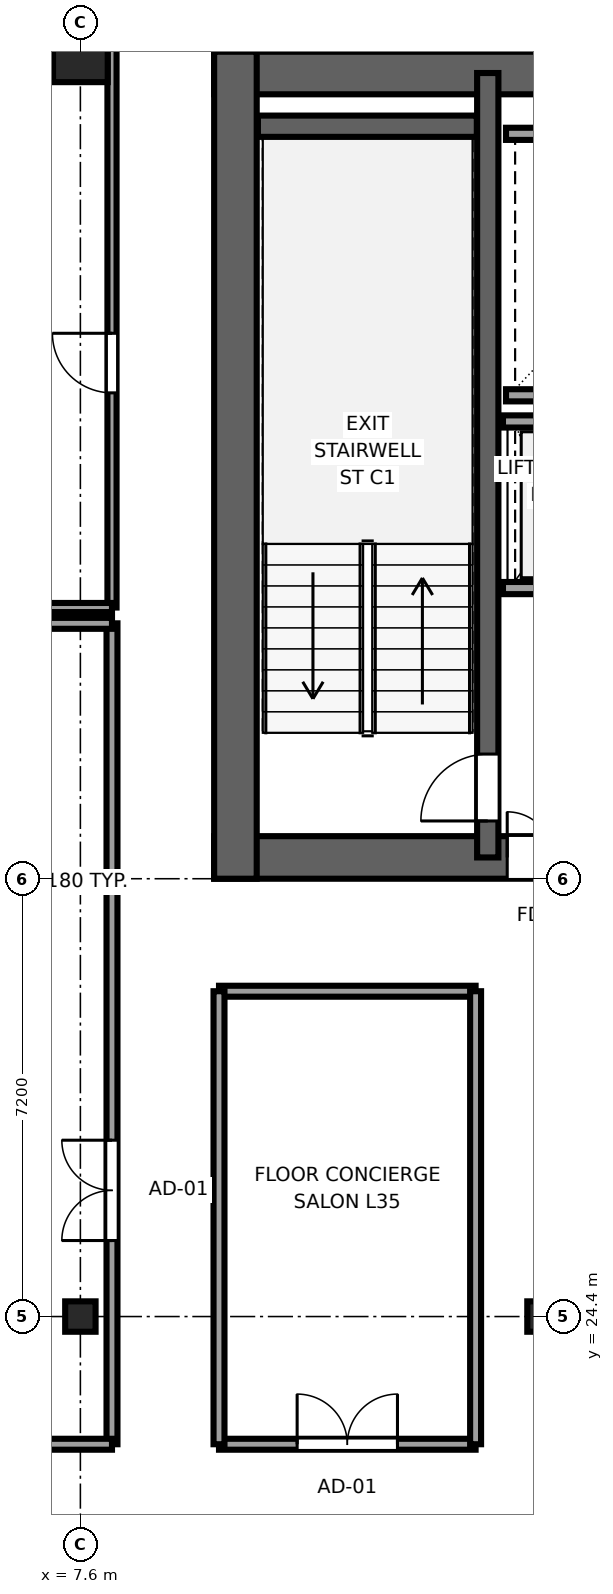
"""IFC4 building model, lengths in metres.
Left out: names, types, materials, properties, quantities, classifications, styles, units other than length and angle.
Written with IfcOpenShell. Run it as: python <this file> out.ifc"""

import sys

from ifc_helpers import new_model, si_unit, direction, frame, frame_2d, origin, origin_2d, place, context, subcontext, project, spatial, rectangle, i_section, extrude, source, transform, mapped, element, fill, save


model = new_model("IFC4")
c1 = context("Model", 3, precision=1e-05, world=origin(), true_north=direction((0.0, 1.0)))
c2 = subcontext(c1, "Body", "Model", "MODEL_VIEW")
j1 = project(units=[si_unit("LENGTHUNIT", "METRE"), si_unit("PLANEANGLEUNIT", "RADIAN")], contexts=[c1])
p1 = place(None, origin())
s1 = spatial("IfcSite", under=j1, at=p1, CompositionType="ELEMENT")
p2 = place(p1, origin())
s2 = spatial("IfcBuilding", under=s1, at=p2, CompositionType="ELEMENT")
p3 = place(p2, frame((0.0, 0.0, 136.4)))
s3 = spatial("IfcBuildingStorey", under=s2, at=p3, CompositionType="ELEMENT", Elevation=136.4)
p4 = place(p3, frame((9.8, 31.95, 0.0), z_axis=(0.0, 0.0, 1.0), x_axis=(1.0, 0.0, 0.0)))
e1 = element("IfcWall", 1, at=p4, inside=s3, PredefinedType="SHEAR", context=c2, shape_type="SweptSolid", body=[
    extrude(rectangle(XDim=26.4, YDim=0.7, at=frame_2d((13.2, 0.0))), origin(), (0.0, 0.0, 1.0), 3.55),
])
p5 = place(p4, frame((6.32, 0.0, 0.0), z_axis=(0.0, 0.0, 1.0), x_axis=(-1.0, 0.0, 0.0)))
e2 = element("IfcOpeningElement", 2, at=p5, cuts=e1, PredefinedType="OPENING", context=c2, shape_type="SweptSolid", body=[
    extrude(rectangle(XDim=1.5, YDim=2.04, at=frame_2d((0.75, 1.02))), frame((0.0, 0.36, 0.0), z_axis=(0.0, -1.0, 0.0), x_axis=(1.0, 0.0, 0.0)), (0.0, 0.0, 1.0), 0.72),
])
p6 = place(p4, frame((13.95, 0.0, 0.0), z_axis=(0.0, 0.0, 1.0), x_axis=(-1.0, 0.0, 0.0)))
e3 = element("IfcOpeningElement", 3, at=p6, cuts=e1, PredefinedType="OPENING", context=c2, shape_type="SweptSolid", body=[
    extrude(rectangle(XDim=1.5, YDim=2.04, at=frame_2d((0.75, 1.02))), frame((0.0, 0.36, 0.0), z_axis=(0.0, -1.0, 0.0), x_axis=(1.0, 0.0, 0.0)), (0.0, 0.0, 1.0), 0.72),
])
p7 = place(p4, frame((21.58, 0.0, 0.0), z_axis=(0.0, 0.0, 1.0), x_axis=(-1.0, 0.0, 0.0)))
e4 = element("IfcOpeningElement", 4, at=p7, cuts=e1, PredefinedType="OPENING", context=c2, shape_type="SweptSolid", body=[
    extrude(rectangle(XDim=1.5, YDim=2.04, at=frame_2d((0.75, 1.02))), frame((0.0, 0.36, 0.0), z_axis=(0.0, -1.0, 0.0), x_axis=(1.0, 0.0, 0.0)), (0.0, 0.0, 1.0), 0.72),
])
p8 = place(p4, frame((8.37, 0.0, 0.0), z_axis=(0.0, 0.0, 1.0), x_axis=(-1.0, 0.0, 0.0)))
e5 = element("IfcOpeningElement", 5, at=p8, cuts=e1, PredefinedType="OPENING", context=c2, shape_type="SweptSolid", body=[
    extrude(rectangle(XDim=0.82, YDim=2.01, at=frame_2d((0.41, 1.005))), frame((0.0, 0.36, 0.0), z_axis=(0.0, -1.0, 0.0), x_axis=(1.0, 0.0, 0.0)), (0.0, 0.0, 1.0), 0.72),
])
p9 = place(p4, frame((18.87, 0.0, 0.0), z_axis=(0.0, 0.0, 1.0), x_axis=(-1.0, 0.0, 0.0)))
e6 = element("IfcOpeningElement", 6, at=p9, cuts=e1, PredefinedType="OPENING", context=c2, shape_type="SweptSolid", body=[
    extrude(rectangle(XDim=0.82, YDim=2.01, at=frame_2d((0.41, 1.005))), frame((0.0, 0.36, 0.0), z_axis=(0.0, -1.0, 0.0), x_axis=(1.0, 0.0, 0.0)), (0.0, 0.0, 1.0), 0.72),
])
p10 = place(p3, frame((9.8, 44.85, 0.0), z_axis=(0.0, 0.0, 1.0), x_axis=(1.0, 0.0, 0.0)))
e7 = element("IfcWall", 7, at=p10, inside=s3, PredefinedType="SHEAR", context=c2, shape_type="SweptSolid", body=[
    extrude(rectangle(XDim=26.4, YDim=0.7, at=frame_2d((13.2, 0.0))), origin(), (0.0, 0.0, 1.0), 3.55),
])
p11 = place(p3, frame((10.15, 31.6, 0.0), z_axis=(0.0, 0.0, 1.0), x_axis=(0.0, 1.0, 0.0)))
e8 = element("IfcWall", 8, at=p11, inside=s3, PredefinedType="SHEAR", context=c2, shape_type="SweptSolid", body=[
    extrude(rectangle(XDim=13.6, YDim=0.7, at=frame_2d((6.8, 0.0))), origin(), (0.0, 0.0, 1.0), 3.55),
])
p12 = place(p3, frame((14.3, 31.95, 0.0), z_axis=(0.0, 0.0, 1.0), x_axis=(0.0, 1.0, 0.0)))
e9 = element("IfcWall", 9, at=p12, inside=s3, PredefinedType="SHEAR", context=c2, shape_type="SweptSolid", body=[
    extrude(rectangle(XDim=12.9, YDim=0.35, at=frame_2d((6.45, 0.0))), origin(), (0.0, 0.0, 1.0), 3.55),
])
p13 = place(p12, frame((0.6, 0.0, 0.0)))
e10 = element("IfcOpeningElement", 10, at=p13, cuts=e9, PredefinedType="OPENING", context=c2, shape_type="SweptSolid", body=[
    extrude(rectangle(XDim=1.1, YDim=2.12, at=frame_2d((0.55, 1.06))), frame((0.0, 0.185, 0.0), z_axis=(0.0, -1.0, 0.0), x_axis=(1.0, 0.0, 0.0)), (0.0, 0.0, 1.0), 0.37),
])
p14 = place(p3, frame((10.52, 43.975, 0.0), z_axis=(0.0, 0.0, 1.0), x_axis=(1.0, 0.0, 0.0)))
e11 = element("IfcWall", 11, at=p14, inside=s3, PredefinedType="SHEAR", context=c2, shape_type="SweptSolid", body=[
    extrude(rectangle(XDim=3.6, YDim=0.35, at=frame_2d((1.8, 0.0))), origin(), (0.0, 0.0, 1.0), 3.55),
])
m1 = source(origin(), c2, "Body", "SweptSolid", [
    extrude(i_section(OverallWidth=0.5, OverallDepth=0.5, WebThickness=0.022, FlangeThickness=0.034, at=origin_2d()), origin(), (0.0, 0.0, 1.0), 3.55),
])
for number, where, z_axis, x_axis in (
    (12, (7.6, 24.4, 0.0), (0.0, 0.0, 1.0), (1.0, 0.0, 0.0)),
    (13, (15.2, 24.4, 0.0), (0.0, 0.0, 1.0), (1.0, 0.0, 0.0)),
):
    element("IfcColumn", number, at=place(p3, frame(where, z_axis=z_axis, x_axis=x_axis)), inside=s3, PredefinedType="COLUMN", context=c2, shape_type="MappedRepresentation", body=[
        mapped(m1, transform((0.0, 0.0, 0.0), x_axis=(1.0, 0.0, 0.0), y_axis=(0.0, 1.0, 0.0), z_axis=(0.0, 0.0, 1.0), scale=1.0)),
    ])
m2 = source(origin(), c2, "Body", "SweptSolid", [
    extrude(rectangle(XDim=0.9, YDim=0.9, at=origin_2d()), origin(), (0.0, 0.0, 1.0), 3.55),
])
p15 = place(p3, frame((7.6, 45.15, 0.0), z_axis=(0.0, 0.0, 1.0), x_axis=(1.0, 0.0, 0.0)))
e14 = element("IfcColumn", 14, at=p15, inside=s3, PredefinedType="COLUMN", context=c2, shape_type="MappedRepresentation", body=[
    mapped(m2, transform((0.0, 0.0, 0.0), x_axis=(1.0, 0.0, 0.0), y_axis=(0.0, 1.0, 0.0), z_axis=(0.0, 0.0, 1.0), scale=1.0)),
])
for number, where, z_axis, x_axis in (
    (15, (14.6, 39.55, 0.0), (0.0, 0.0, 1.0), (1.0, 0.0, 0.0)),
    (16, (14.6, 43.85, 0.0), (0.0, 0.0, 1.0), (1.0, 0.0, 0.0)),
):
    element("IfcWall", number, at=place(p3, frame(where, z_axis=z_axis, x_axis=x_axis)), inside=s3, PredefinedType="SOLIDWALL", context=c2, shape_type="SweptSolid", body=[
        extrude(rectangle(XDim=4.1, YDim=0.2, at=frame_2d((2.05, 0.0))), origin(), (0.0, 0.0, 1.0), 3.37),
    ])
p16 = place(p3, frame((14.55, 36.38, 0.0), z_axis=(0.0, 0.0, 1.0), x_axis=(1.0, 0.0, 0.0)))
e17 = element("IfcWall", 17, at=p16, inside=s3, PredefinedType="SOLIDWALL", context=c2, shape_type="SweptSolid", body=[
    extrude(rectangle(XDim=4.075, YDim=0.2, at=frame_2d((2.038, 0.0))), origin(), (0.0, 0.0, 1.0), 3.37),
])
p17 = place(p16, frame((0.55, 0.0, 0.0)))
e18 = element("IfcOpeningElement", 18, at=p17, cuts=e17, PredefinedType="OPENING", context=c2, shape_type="SweptSolid", body=[
    extrude(rectangle(XDim=1.1, YDim=2.12, at=frame_2d((0.55, 1.06))), frame((0.0, 0.11, 0.0), z_axis=(0.0, -1.0, 0.0), x_axis=(1.0, 0.0, 0.0)), (0.0, 0.0, 1.0), 0.22),
])
p18 = place(p16, frame((2.45, 0.0, 0.0)))
e19 = element("IfcOpeningElement", 19, at=p18, cuts=e17, PredefinedType="OPENING", context=c2, shape_type="SweptSolid", body=[
    extrude(rectangle(XDim=1.1, YDim=2.12, at=frame_2d((0.55, 1.06))), frame((0.0, 0.11, 0.0), z_axis=(0.0, -1.0, 0.0), x_axis=(1.0, 0.0, 0.0)), (0.0, 0.0, 1.0), 0.22),
])
p19 = place(p3, frame((14.55, 39.12, 0.0), z_axis=(0.0, 0.0, 1.0), x_axis=(1.0, 0.0, 0.0)))
e20 = element("IfcWall", 20, at=p19, inside=s3, PredefinedType="SOLIDWALL", context=c2, shape_type="SweptSolid", body=[
    extrude(rectangle(XDim=4.075, YDim=0.2, at=frame_2d((2.038, 0.0))), origin(), (0.0, 0.0, 1.0), 3.37),
])
p20 = place(p3, frame((8.12, 22.3, 0.0), z_axis=(0.0, 0.0, 1.0), x_axis=(0.0, 1.0, 0.0)))
e21 = element("IfcWall", 21, at=p20, inside=s3, PredefinedType="PARTITIONING", context=c2, shape_type="SweptSolid", body=[
    extrude(rectangle(XDim=13.5, YDim=0.18, at=frame_2d((6.75, 0.0))), origin(), (0.0, 0.0, 1.0), 3.37),
])
p21 = place(p20, frame((3.35, 0.0, 0.0)))
e22 = element("IfcOpeningElement", 22, at=p21, cuts=e21, PredefinedType="OPENING", context=c2, shape_type="SweptSolid", body=[
    extrude(rectangle(XDim=1.65, YDim=2.15, at=frame_2d((0.825, 1.075))), frame((0.0, 0.1, 0.0), z_axis=(0.0, -1.0, 0.0), x_axis=(1.0, 0.0, 0.0)), (0.0, 0.0, 1.0), 0.2),
])
for number, where, z_axis, x_axis in (
    (23, (0.405, 22.3, 0.0), (0.0, 0.0, 1.0), (1.0, 0.0, 0.0)),
    (24, (0.405, 35.8, 0.0), (0.0, 0.0, 1.0), (1.0, 0.0, 0.0)),
):
    element("IfcWall", number, at=place(p3, frame(where, z_axis=z_axis, x_axis=x_axis)), inside=s3, PredefinedType="PARTITIONING", context=c2, shape_type="SweptSolid", body=[
        extrude(rectangle(XDim=7.715, YDim=0.18, at=frame_2d((3.857, 0.0))), origin(), (0.0, 0.0, 1.0), 3.37),
    ])
p22 = place(p3, frame((8.12, 36.06, 0.0), z_axis=(0.0, 0.0, 1.0), x_axis=(0.0, 1.0, 0.0)))
e25 = element("IfcWall", 25, at=p22, inside=s3, PredefinedType="PARTITIONING", context=c2, shape_type="SweptSolid", body=[
    extrude(rectangle(XDim=9.535, YDim=0.15, at=frame_2d((4.768, 0.0))), origin(), (0.0, 0.0, 1.0), 3.37),
])
p23 = place(p22, frame((3.53, 0.0, 0.0)))
e26 = element("IfcOpeningElement", 26, at=p23, cuts=e25, PredefinedType="OPENING", context=c2, shape_type="SweptSolid", body=[
    extrude(rectangle(XDim=0.98, YDim=2.12, at=frame_2d((0.49, 1.06))), frame((0.0, 0.085, 0.0), z_axis=(0.0, -1.0, 0.0), x_axis=(1.0, 0.0, 0.0)), (0.0, 0.0, 1.0), 0.17),
])
p24 = place(p3, frame((2.77, 36.06, 0.0), z_axis=(0.0, 0.0, 1.0), x_axis=(1.0, 0.0, 0.0)))
e27 = element("IfcWall", 27, at=p24, inside=s3, PredefinedType="PARTITIONING", context=c2, shape_type="SweptSolid", body=[
    extrude(rectangle(XDim=5.35, YDim=0.15, at=frame_2d((2.675, 0.0))), origin(), (0.0, 0.0, 1.0), 3.37),
])
p25 = place(p3, frame((9.88, 22.3, 0.0), z_axis=(0.0, 0.0, 1.0), x_axis=(1.0, 0.0, 0.0)))
e28 = element("IfcWall", 28, at=p25, inside=s3, PredefinedType="PARTITIONING", context=c2, shape_type="SweptSolid", body=[
    extrude(rectangle(XDim=4.22, YDim=0.18, at=frame_2d((2.11, 0.0))), origin(), (0.0, 0.0, 1.0), 3.37),
])
p26 = place(p25, frame((1.285, 0.0, 0.0)))
e29 = element("IfcOpeningElement", 29, at=p26, cuts=e28, PredefinedType="OPENING", context=c2, shape_type="SweptSolid", body=[
    extrude(rectangle(XDim=1.65, YDim=2.15, at=frame_2d((0.825, 1.075))), frame((0.0, 0.1, 0.0), z_axis=(0.0, -1.0, 0.0), x_axis=(1.0, 0.0, 0.0)), (0.0, 0.0, 1.0), 0.2),
])
p27 = place(p3, frame((9.88, 29.75, 0.0), z_axis=(0.0, 0.0, 1.0), x_axis=(1.0, 0.0, 0.0)))
e30 = element("IfcWall", 30, at=p27, inside=s3, PredefinedType="PARTITIONING", context=c2, shape_type="SweptSolid", body=[
    extrude(rectangle(XDim=4.22, YDim=0.18, at=frame_2d((2.11, 0.0))), origin(), (0.0, 0.0, 1.0), 3.37),
])
for number, where, z_axis, x_axis in (
    (31, (9.88, 22.3, 0.0), (0.0, 0.0, 1.0), (0.0, 1.0, 0.0)),
    (32, (14.1, 22.3, 0.0), (0.0, 0.0, 1.0), (0.0, 1.0, 0.0)),
):
    element("IfcWall", number, at=place(p3, frame(where, z_axis=z_axis, x_axis=x_axis)), inside=s3, PredefinedType="PARTITIONING", context=c2, shape_type="SweptSolid", body=[
        extrude(rectangle(XDim=7.45, YDim=0.18, at=frame_2d((3.725, 0.0))), origin(), (0.0, 0.0, 1.0), 3.37),
    ])
m3 = source(origin(), c2, "Body", "SweptSolid", [
    extrude(rectangle(XDim=1.1, YDim=2.12, at=frame_2d((0.55, 1.06))), frame((0.0, 0.025, 0.0), z_axis=(0.0, -1.0, 0.0), x_axis=(1.0, 0.0, 0.0)), (0.0, 0.0, 1.0), 0.05),
])
p28 = place(p13, origin())
e33 = element("IfcDoor", 33, at=p28, inside=s3, OperationType="SINGLE_SWING_LEFT", PredefinedType="DOOR", context=c2, shape_type="MappedRepresentation", body=[
    mapped(m3, transform((0.0, 0.0, 0.0), x_axis=(1.0, 0.0, 0.0), y_axis=(0.0, 1.0, 0.0), z_axis=(0.0, 0.0, 1.0), scale=1.0)),
])
fill(e10, e33)
m4 = source(origin(), c2, "Body", "SweptSolid", [
    extrude(rectangle(XDim=1.5, YDim=2.04, at=frame_2d((0.75, 1.02))), frame((0.0, 0.025, 0.0), z_axis=(0.0, -1.0, 0.0), x_axis=(1.0, 0.0, 0.0)), (0.0, 0.0, 1.0), 0.05),
])
p29 = place(p5, origin())
e34 = element("IfcDoor", 34, at=p29, inside=s3, OperationType="DOUBLE_DOOR_SINGLE_SWING", PredefinedType="DOOR", context=c2, shape_type="MappedRepresentation", body=[
    mapped(m4, transform((0.0, 0.0, 0.0), x_axis=(1.0, 0.0, 0.0), y_axis=(0.0, 1.0, 0.0), z_axis=(0.0, 0.0, 1.0), scale=1.0)),
])
fill(e2, e34)
m5 = source(origin(), c2, "Body", "SweptSolid", [
    extrude(rectangle(XDim=1.65, YDim=2.15, at=frame_2d((0.825, 1.075))), frame((0.0, 0.025, 0.0), z_axis=(0.0, -1.0, 0.0), x_axis=(1.0, 0.0, 0.0)), (0.0, 0.0, 1.0), 0.05),
])
p30 = place(p21, origin())
e35 = element("IfcDoor", 35, at=p30, inside=s3, OperationType="DOUBLE_DOOR_SINGLE_SWING", PredefinedType="DOOR", context=c2, shape_type="MappedRepresentation", body=[
    mapped(m5, transform((0.0, 0.0, 0.0), x_axis=(1.0, 0.0, 0.0), y_axis=(0.0, 1.0, 0.0), z_axis=(0.0, 0.0, 1.0), scale=1.0)),
])
fill(e22, e35)
m6 = source(origin(), c2, "Body", "SweptSolid", [
    extrude(rectangle(XDim=0.98, YDim=2.12, at=frame_2d((0.49, 1.06))), frame((0.0, 0.025, 0.0), z_axis=(0.0, -1.0, 0.0), x_axis=(1.0, 0.0, 0.0)), (0.0, 0.0, 1.0), 0.05),
])
p31 = place(p23, origin())
e36 = element("IfcDoor", 36, at=p31, inside=s3, OperationType="SINGLE_SWING_RIGHT", PredefinedType="DOOR", context=c2, shape_type="MappedRepresentation", body=[
    mapped(m6, transform((0.0, 0.0, 0.0), x_axis=(1.0, 0.0, 0.0), y_axis=(0.0, 1.0, 0.0), z_axis=(0.0, 0.0, 1.0), scale=1.0)),
])
fill(e26, e36)
p32 = place(p26, origin())
e37 = element("IfcDoor", 37, at=p32, inside=s3, OperationType="DOUBLE_DOOR_SINGLE_SWING", PredefinedType="DOOR", context=c2, shape_type="MappedRepresentation", body=[
    mapped(m5, transform((0.0, 0.0, 0.0), x_axis=(1.0, 0.0, 0.0), y_axis=(0.0, 1.0, 0.0), z_axis=(0.0, 0.0, 1.0), scale=1.0)),
])
fill(e29, e37)
save(model, sys.argv[1])
